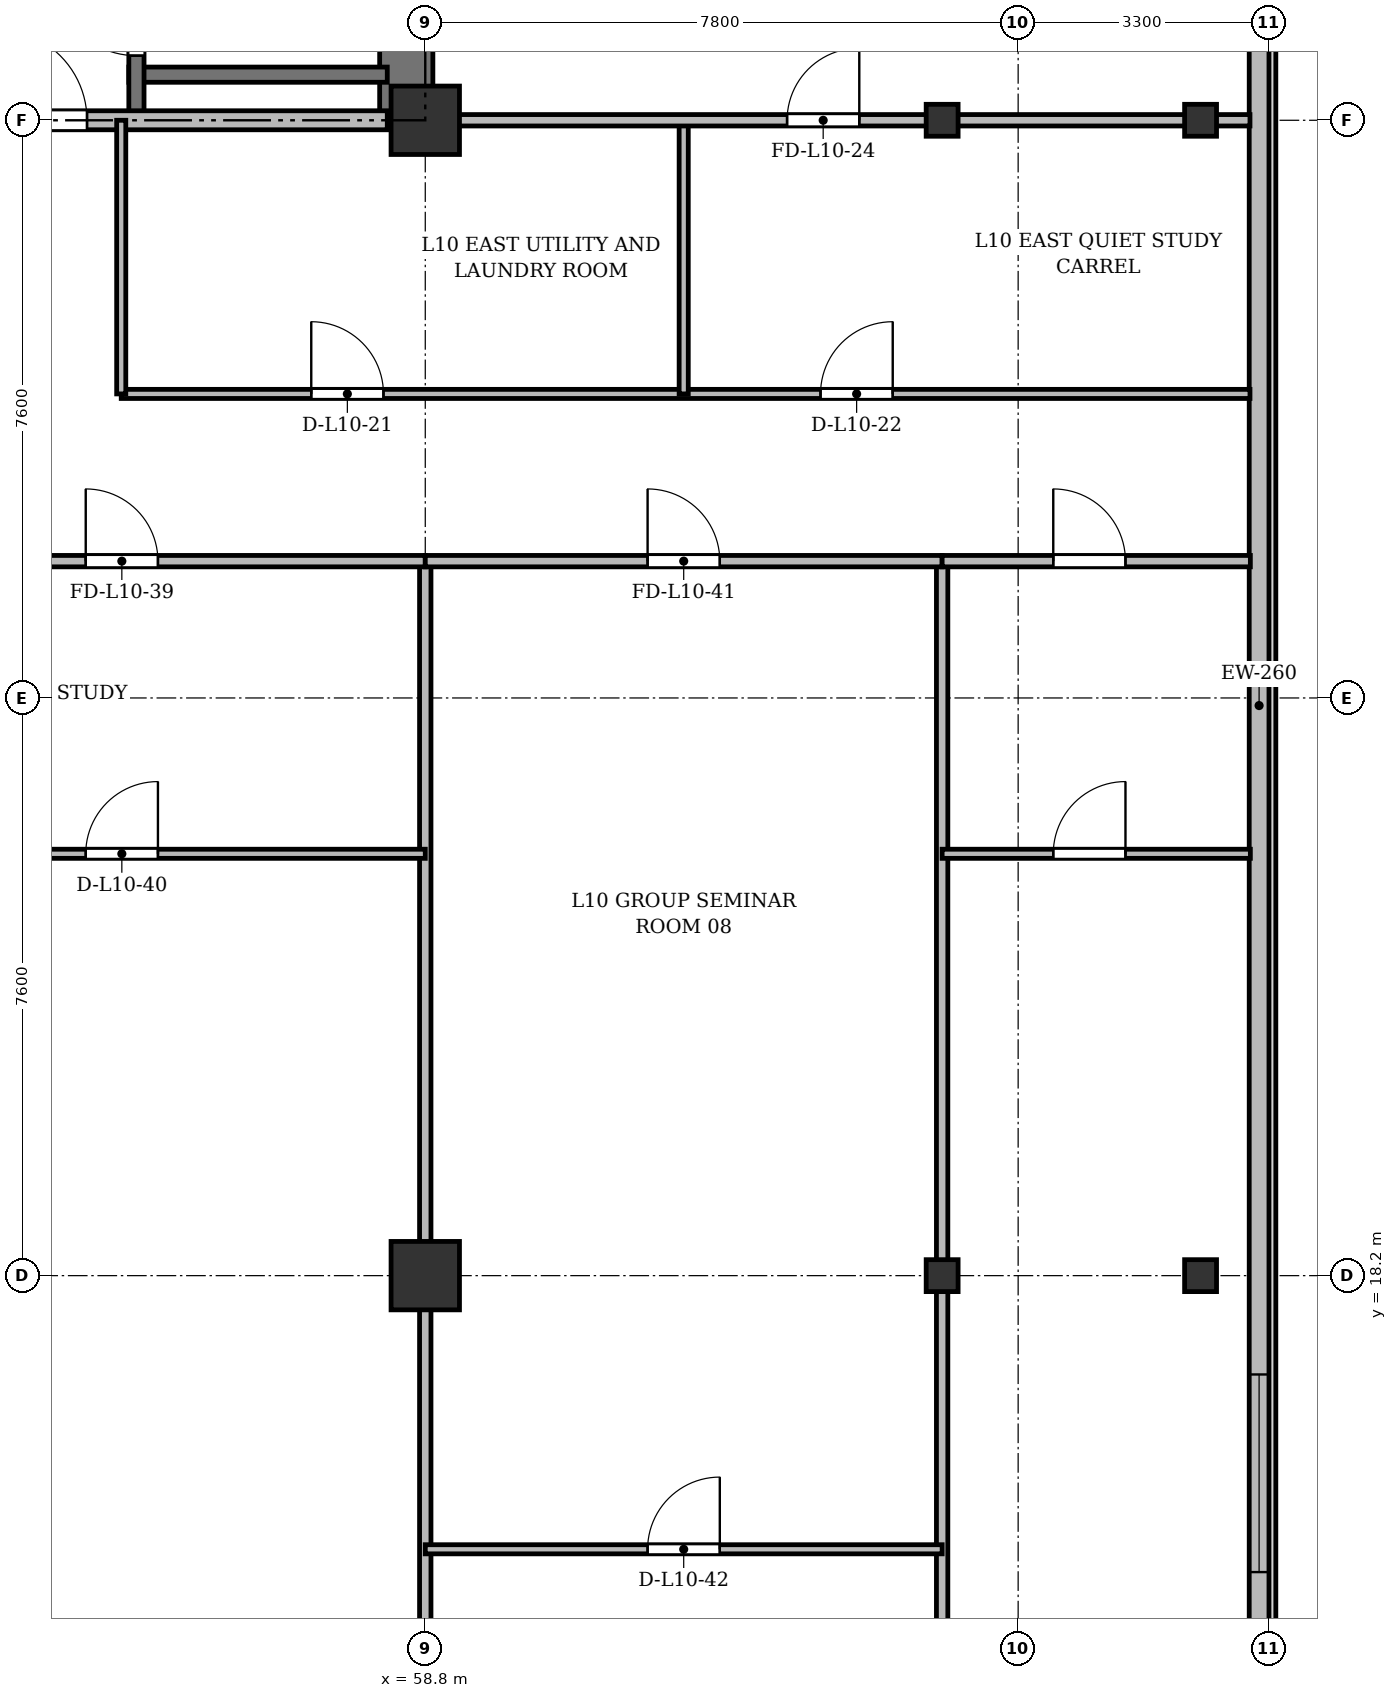
"""IFC4 building model, lengths in metres.
Left out: names, types, materials, properties, quantities, classifications, styles, units other than length and angle.
Written with IfcOpenShell. Run it as: python <this file> out.ifc"""

import sys

from ifc_helpers import new_model, si_unit, direction, frame, frame_2d, origin, origin_2d, place, context, subcontext, project, spatial, rectangle, i_section, extrude, source, transform, mapped, element, fill, save


model = new_model("IFC4")
c1 = context("Model", 3, precision=1e-05, world=origin(), true_north=direction((0.0, 1.0)))
c2 = subcontext(c1, "Body", "Model", "MODEL_VIEW")
j1 = project(units=[si_unit("LENGTHUNIT", "METRE"), si_unit("PLANEANGLEUNIT", "RADIAN")], contexts=[c1])
p1 = place(None, origin())
s1 = spatial("IfcSite", under=j1, at=p1, CompositionType="ELEMENT")
p2 = place(p1, origin())
s2 = spatial("IfcBuilding", under=s1, at=p2, CompositionType="ELEMENT")
p3 = place(p2, frame((0.0, 0.0, 41.5)))
s3 = spatial("IfcBuildingStorey", under=s2, at=p3, CompositionType="ELEMENT", Elevation=41.5)
m1 = source(origin(), c2, "Body", "SweptSolid", [
    extrude(rectangle(XDim=0.9, YDim=0.9, at=origin_2d()), origin(), (0.0, 0.0, 1.0), 3.6),
])
for number, where, z_axis, x_axis in (
    (1, (58.8, 18.2, 0.0), (0.0, 0.0, 1.0), (1.0, 0.0, 0.0)),
    (2, (58.8, 33.4, 0.0), (0.0, 0.0, 1.0), (1.0, 0.0, 0.0)),
):
    element("IfcColumn", number, at=place(p3, frame(where, z_axis=z_axis, x_axis=x_axis)), inside=s3, PredefinedType="COLUMN", context=c2, shape_type="MappedRepresentation", body=[
        mapped(m1, transform((0.0, 0.0, 0.0), x_axis=(1.0, 0.0, 0.0), y_axis=(0.0, 1.0, 0.0), z_axis=(0.0, 0.0, 1.0), scale=1.0)),
    ])
m2 = source(origin(), c2, "Body", "SweptSolid", [
    extrude(i_section(OverallWidth=0.42, OverallDepth=0.42, WebThickness=0.026, FlangeThickness=0.04, at=origin_2d()), origin(), (0.0, 0.0, 1.0), 3.6),
])
for number, where, z_axis, x_axis in (
    (3, (65.6, 18.2, 0.0), (0.0, 0.0, 1.0), (1.0, 0.0, 0.0)),
    (4, (65.6, 33.4, 0.0), (0.0, 0.0, 1.0), (1.0, 0.0, 0.0)),
    (5, (69.0, 18.2, 0.0), (0.0, 0.0, 1.0), (1.0, 0.0, 0.0)),
    (6, (69.0, 33.4, 0.0), (0.0, 0.0, 1.0), (1.0, 0.0, 0.0)),
):
    element("IfcColumn", number, at=place(p3, frame(where, z_axis=z_axis, x_axis=x_axis)), inside=s3, PredefinedType="COLUMN", context=c2, shape_type="MappedRepresentation", body=[
        mapped(m2, transform((0.0, 0.0, 0.0), x_axis=(1.0, 0.0, 0.0), y_axis=(0.0, 1.0, 0.0), z_axis=(0.0, 0.0, 1.0), scale=1.0)),
    ])
p4 = place(p3, frame((69.77, 45.5, 0.0), z_axis=(0.0, 0.0, 1.0), x_axis=(0.0, -1.0, 0.0)))
e7 = element("IfcWall", 7, at=p4, inside=s3, PredefinedType="SOLIDWALL", context=c2, shape_type="SweptSolid", body=[
    extrude(rectangle(XDim=39.6, YDim=0.26, at=frame_2d((19.8, 0.0))), origin(), (0.0, 0.0, 1.0), 3.34),
])
p5 = place(p4, frame((36.95, 0.0, 0.92)))
e8 = element("IfcOpeningElement", 8, at=p5, cuts=e7, PredefinedType="OPENING", context=c2, shape_type="SweptSolid", body=[
    extrude(rectangle(XDim=1.2, YDim=1.65, at=frame_2d((0.6, 0.825))), frame((0.0, 0.14, 0.0), z_axis=(0.0, -1.0, 0.0), x_axis=(1.0, 0.0, 0.0)), (0.0, 0.0, 1.0), 0.28),
])
p6 = place(p4, frame((32.8, 0.0, 0.92)))
e9 = element("IfcOpeningElement", 9, at=p6, cuts=e7, PredefinedType="OPENING", context=c2, shape_type="SweptSolid", body=[
    extrude(rectangle(XDim=2.6, YDim=1.9, at=frame_2d((1.3, 0.95))), frame((0.0, 0.14, 0.0), z_axis=(0.0, -1.0, 0.0), x_axis=(1.0, 0.0, 0.0)), (0.0, 0.0, 1.0), 0.28),
])
p7 = place(p4, frame((28.6, 0.0, 0.92)))
e10 = element("IfcOpeningElement", 10, at=p7, cuts=e7, PredefinedType="OPENING", context=c2, shape_type="SweptSolid", body=[
    extrude(rectangle(XDim=2.6, YDim=1.9, at=frame_2d((1.3, 0.95))), frame((0.0, 0.14, 0.0), z_axis=(0.0, -1.0, 0.0), x_axis=(1.0, 0.0, 0.0)), (0.0, 0.0, 1.0), 0.28),
])
p8 = place(p4, frame((7.4, 0.0, 0.92)))
e11 = element("IfcOpeningElement", 11, at=p8, cuts=e7, PredefinedType="OPENING", context=c2, shape_type="SweptSolid", body=[
    extrude(rectangle(XDim=2.6, YDim=1.9, at=frame_2d((1.3, 0.95))), frame((0.0, 0.14, 0.0), z_axis=(0.0, -1.0, 0.0), x_axis=(1.0, 0.0, 0.0)), (0.0, 0.0, 1.0), 0.28),
])
p9 = place(p4, frame((4.5, 0.0, 0.92)))
e12 = element("IfcOpeningElement", 12, at=p9, cuts=e7, PredefinedType="OPENING", context=c2, shape_type="SweptSolid", body=[
    extrude(rectangle(XDim=1.2, YDim=1.65, at=frame_2d((0.6, 0.825))), frame((0.0, 0.14, 0.0), z_axis=(0.0, -1.0, 0.0), x_axis=(1.0, 0.0, 0.0)), (0.0, 0.0, 1.0), 0.28),
])
p10 = place(p4, frame((1.15, 0.0, 0.92)))
e13 = element("IfcOpeningElement", 13, at=p10, cuts=e7, PredefinedType="OPENING", context=c2, shape_type="SweptSolid", body=[
    extrude(rectangle(XDim=1.2, YDim=1.65, at=frame_2d((0.6, 0.825))), frame((0.0, 0.14, 0.0), z_axis=(0.0, -1.0, 0.0), x_axis=(1.0, 0.0, 0.0)), (0.0, 0.0, 1.0), 0.28),
])
p11 = place(p3, frame((58.55, 33.4, 0.0), z_axis=(0.0, 0.0, 1.0), x_axis=(0.0, 1.0, 0.0)))
e14 = element("IfcWall", 14, at=p11, inside=s3, PredefinedType="SHEAR", context=c2, shape_type="SweptSolid", body=[
    extrude(rectangle(XDim=11.7, YDim=0.7, at=frame_2d((5.85, 0.0))), origin(), (0.0, 0.0, 1.0), 3.34),
])
p12 = place(p3, frame((54.9, 34.0, 0.0), z_axis=(0.0, 0.0, 1.0), x_axis=(1.0, 0.0, 0.0)))
e15 = element("IfcWall", 15, at=p12, inside=s3, PredefinedType="SHEAR", context=c2, shape_type="SweptSolid", body=[
    extrude(rectangle(XDim=3.4, YDim=0.2, at=frame_2d((1.7, 0.0))), origin(), (0.0, 0.0, 1.0), 3.34),
])
p13 = place(p3, frame((55.0, 33.4, 0.0), z_axis=(0.0, 0.0, 1.0), x_axis=(0.0, 1.0, 0.0)))
e16 = element("IfcWall", 16, at=p13, inside=s3, PredefinedType="SHEAR", context=c2, shape_type="SweptSolid", body=[
    extrude(rectangle(XDim=11.1, YDim=0.2, at=frame_2d((5.55, 0.0))), origin(), (0.0, 0.0, 1.0), 3.34),
])
p14 = place(p13, frame((0.85, 0.0, 0.0)))
e17 = element("IfcOpeningElement", 17, at=p14, cuts=e16, PredefinedType="OPENING", context=c2, shape_type="SweptSolid", body=[
    extrude(rectangle(XDim=1.1, YDim=2.15, at=frame_2d((0.55, 1.075))), frame((0.0, 0.11, 0.0), z_axis=(0.0, -1.0, 0.0), x_axis=(1.0, 0.0, 0.0)), (0.0, 0.0, 1.0), 0.22),
])
p15 = place(p3, frame((47.15, 33.4, 0.0), z_axis=(0.0, 0.0, 1.0), x_axis=(1.0, 0.0, 0.0)))
e18 = element("IfcWall", 18, at=p15, inside=s3, PredefinedType="PARTITIONING", context=c2, shape_type="SweptSolid", body=[
    extrude(rectangle(XDim=11.15, YDim=0.25, at=frame_2d((5.575, 0.0))), origin(), (0.0, 0.0, 1.0), 2.69),
])
p16 = place(p15, frame((0.7, 0.0, 0.0)))
e19 = element("IfcOpeningElement", 19, at=p16, cuts=e18, PredefinedType="OPENING", context=c2, shape_type="SweptSolid", body=[
    extrude(rectangle(XDim=0.95, YDim=2.15, at=frame_2d((0.475, 1.075))), frame((0.0, 0.135, 0.0), z_axis=(0.0, -1.0, 0.0), x_axis=(1.0, 0.0, 0.0)), (0.0, 0.0, 1.0), 0.27),
])
p17 = place(p15, frame((6.0, 0.0, 0.0)))
e20 = element("IfcOpeningElement", 20, at=p17, cuts=e18, PredefinedType="OPENING", context=c2, shape_type="SweptSolid", body=[
    extrude(rectangle(XDim=1.2, YDim=2.15, at=frame_2d((0.6, 1.075))), frame((0.0, 0.135, 0.0), z_axis=(0.0, -1.0, 0.0), x_axis=(1.0, 0.0, 0.0)), (0.0, 0.0, 1.0), 0.27),
])
p18 = place(p3, frame((54.8, 29.8, 0.0), z_axis=(0.0, 0.0, 1.0), x_axis=(1.0, 0.0, 0.0)))
e21 = element("IfcWall", 21, at=p18, inside=s3, PredefinedType="PARTITIONING", context=c2, shape_type="SweptSolid", body=[
    extrude(rectangle(XDim=14.85, YDim=0.12, at=frame_2d((7.425, 0.0))), origin(), (0.0, 0.0, 1.0), 2.752),
])
p19 = place(p18, frame((2.5, 0.0, 0.0)))
e22 = element("IfcOpeningElement", 22, at=p19, cuts=e21, PredefinedType="OPENING", context=c2, shape_type="SweptSolid", body=[
    extrude(rectangle(XDim=0.95, YDim=2.15, at=frame_2d((0.475, 1.075))), frame((0.0, 0.07, 0.0), z_axis=(0.0, -1.0, 0.0), x_axis=(1.0, 0.0, 0.0)), (0.0, 0.0, 1.0), 0.14),
])
p20 = place(p18, frame((9.2, 0.0, 0.0)))
e23 = element("IfcOpeningElement", 23, at=p20, cuts=e21, PredefinedType="OPENING", context=c2, shape_type="SweptSolid", body=[
    extrude(rectangle(XDim=0.95, YDim=2.15, at=frame_2d((0.475, 1.075))), frame((0.0, 0.07, 0.0), z_axis=(0.0, -1.0, 0.0), x_axis=(1.0, 0.0, 0.0)), (0.0, 0.0, 1.0), 0.14),
])
for number, where, z_axis, x_axis in (
    (24, (62.2, 29.8, 0.0), (0.0, 0.0, 1.0), (0.0, 1.0, 0.0)),
    (25, (54.8, 29.8, 0.0), (0.0, 0.0, 1.0), (0.0, 1.0, 0.0)),
):
    element("IfcWall", number, at=place(p3, frame(where, z_axis=z_axis, x_axis=x_axis)), inside=s3, PredefinedType="PARTITIONING", context=c2, shape_type="SweptSolid", body=[
        extrude(rectangle(XDim=3.6, YDim=0.12, at=frame_2d((1.8, 0.0))), origin(), (0.0, 0.0, 1.0), 2.69),
    ])
p21 = place(p3, frame((58.8, 33.4, 0.0), z_axis=(0.0, 0.0, 1.0), x_axis=(1.0, 0.0, 0.0)))
e26 = element("IfcWall", 26, at=p21, inside=s3, PredefinedType="PARTITIONING", context=c2, shape_type="SweptSolid", body=[
    extrude(rectangle(XDim=10.85, YDim=0.15, at=frame_2d((5.425, 0.0))), origin(), (0.0, 0.0, 1.0), 2.69),
])
p22 = place(p21, frame((4.76, 0.0, 0.0)))
e27 = element("IfcOpeningElement", 27, at=p22, cuts=e26, PredefinedType="OPENING", context=c2, shape_type="SweptSolid", body=[
    extrude(rectangle(XDim=0.95, YDim=2.15, at=frame_2d((0.475, 1.075))), frame((0.0, 0.085, 0.0), z_axis=(0.0, -1.0, 0.0), x_axis=(1.0, 0.0, 0.0)), (0.0, 0.0, 1.0), 0.17),
])
for number, where, z_axis, x_axis in (
    (28, (58.8, 3.145, 0.0), (0.0, 0.0, 1.0), (0.0, 1.0, 0.0)),
    (29, (65.6, 3.145, 0.0), (0.0, 0.0, 1.0), (0.0, 1.0, 0.0)),
):
    element("IfcWall", number, at=place(p3, frame(where, z_axis=z_axis, x_axis=x_axis)), inside=s3, PredefinedType="PARTITIONING", context=c2, shape_type="SweptSolid", body=[
        extrude(rectangle(XDim=24.455, YDim=0.15, at=frame_2d((12.228, 0.0))), origin(), (0.0, 0.0, 1.0), 2.752),
    ])
p23 = place(p3, frame((51.0, 27.6, 0.0), z_axis=(0.0, 0.0, 1.0), x_axis=(1.0, 0.0, 0.0)))
e30 = element("IfcWall", 30, at=p23, inside=s3, PredefinedType="PARTITIONING", context=c2, shape_type="SweptSolid", body=[
    extrude(rectangle(XDim=7.8, YDim=0.15, at=frame_2d((3.9, 0.0))), origin(), (0.0, 0.0, 1.0), 2.752),
])
p24 = place(p23, frame((3.333, 0.0, 0.0)))
e31 = element("IfcOpeningElement", 31, at=p24, cuts=e30, PredefinedType="OPENING", context=c2, shape_type="SweptSolid", body=[
    extrude(rectangle(XDim=0.95, YDim=2.15, at=frame_2d((0.475, 1.075))), frame((0.0, 0.085, 0.0), z_axis=(0.0, -1.0, 0.0), x_axis=(1.0, 0.0, 0.0)), (0.0, 0.0, 1.0), 0.17),
])
p25 = place(p3, frame((51.0, 23.75, 0.0), z_axis=(0.0, 0.0, 1.0), x_axis=(1.0, 0.0, 0.0)))
e32 = element("IfcWall", 32, at=p25, inside=s3, PredefinedType="PARTITIONING", context=c2, shape_type="SweptSolid", body=[
    extrude(rectangle(XDim=7.8, YDim=0.12, at=frame_2d((3.9, 0.0))), origin(), (0.0, 0.0, 1.0), 2.752),
])
p26 = place(p25, frame((3.333, 0.0, 0.0)))
e33 = element("IfcOpeningElement", 33, at=p26, cuts=e32, PredefinedType="OPENING", context=c2, shape_type="SweptSolid", body=[
    extrude(rectangle(XDim=0.95, YDim=2.15, at=frame_2d((0.475, 1.075))), frame((0.0, 0.07, 0.0), z_axis=(0.0, -1.0, 0.0), x_axis=(1.0, 0.0, 0.0)), (0.0, 0.0, 1.0), 0.14),
])
p27 = place(p3, frame((58.8, 27.6, 0.0), z_axis=(0.0, 0.0, 1.0), x_axis=(1.0, 0.0, 0.0)))
e34 = element("IfcWall", 34, at=p27, inside=s3, PredefinedType="PARTITIONING", context=c2, shape_type="SweptSolid", body=[
    extrude(rectangle(XDim=6.8, YDim=0.15, at=frame_2d((3.4, 0.0))), origin(), (0.0, 0.0, 1.0), 2.752),
])
p28 = place(p27, frame((2.925, 0.0, 0.0)))
e35 = element("IfcOpeningElement", 35, at=p28, cuts=e34, PredefinedType="OPENING", context=c2, shape_type="SweptSolid", body=[
    extrude(rectangle(XDim=0.95, YDim=2.15, at=frame_2d((0.475, 1.075))), frame((0.0, 0.085, 0.0), z_axis=(0.0, -1.0, 0.0), x_axis=(1.0, 0.0, 0.0)), (0.0, 0.0, 1.0), 0.17),
])
p29 = place(p3, frame((58.8, 14.6, 0.0), z_axis=(0.0, 0.0, 1.0), x_axis=(1.0, 0.0, 0.0)))
e36 = element("IfcWall", 36, at=p29, inside=s3, PredefinedType="PARTITIONING", context=c2, shape_type="SweptSolid", body=[
    extrude(rectangle(XDim=6.8, YDim=0.12, at=frame_2d((3.4, 0.0))), origin(), (0.0, 0.0, 1.0), 2.752),
])
p30 = place(p29, frame((2.925, 0.0, 0.0)))
e37 = element("IfcOpeningElement", 37, at=p30, cuts=e36, PredefinedType="OPENING", context=c2, shape_type="SweptSolid", body=[
    extrude(rectangle(XDim=0.95, YDim=2.15, at=frame_2d((0.475, 1.075))), frame((0.0, 0.07, 0.0), z_axis=(0.0, -1.0, 0.0), x_axis=(1.0, 0.0, 0.0)), (0.0, 0.0, 1.0), 0.14),
])
p31 = place(p3, frame((65.6, 27.6, 0.0), z_axis=(0.0, 0.0, 1.0), x_axis=(1.0, 0.0, 0.0)))
e38 = element("IfcWall", 38, at=p31, inside=s3, PredefinedType="PARTITIONING", context=c2, shape_type="SweptSolid", body=[
    extrude(rectangle(XDim=4.055, YDim=0.15, at=frame_2d((2.027, 0.0))), origin(), (0.0, 0.0, 1.0), 2.752),
])
p32 = place(p31, frame((1.462, 0.0, 0.0)))
e39 = element("IfcOpeningElement", 39, at=p32, cuts=e38, PredefinedType="OPENING", context=c2, shape_type="SweptSolid", body=[
    extrude(rectangle(XDim=0.95, YDim=2.15, at=frame_2d((0.475, 1.075))), frame((0.0, 0.085, 0.0), z_axis=(0.0, -1.0, 0.0), x_axis=(1.0, 0.0, 0.0)), (0.0, 0.0, 1.0), 0.17),
])
p33 = place(p3, frame((65.6, 23.75, 0.0), z_axis=(0.0, 0.0, 1.0), x_axis=(1.0, 0.0, 0.0)))
e40 = element("IfcWall", 40, at=p33, inside=s3, PredefinedType="PARTITIONING", context=c2, shape_type="SweptSolid", body=[
    extrude(rectangle(XDim=4.055, YDim=0.12, at=frame_2d((2.027, 0.0))), origin(), (0.0, 0.0, 1.0), 2.752),
])
p34 = place(p33, frame((1.462, 0.0, 0.0)))
e41 = element("IfcOpeningElement", 41, at=p34, cuts=e40, PredefinedType="OPENING", context=c2, shape_type="SweptSolid", body=[
    extrude(rectangle(XDim=0.95, YDim=2.15, at=frame_2d((0.475, 1.075))), frame((0.0, 0.07, 0.0), z_axis=(0.0, -1.0, 0.0), x_axis=(1.0, 0.0, 0.0)), (0.0, 0.0, 1.0), 0.14),
])
m3 = source(origin(), c2, "Body", "SweptSolid", [
    extrude(rectangle(XDim=2.6, YDim=1.9, at=frame_2d((1.3, 0.95))), frame((0.0, 0.03, 0.0), z_axis=(0.0, -1.0, 0.0), x_axis=(1.0, 0.0, 0.0)), (0.0, 0.0, 1.0), 0.06),
])
p35 = place(p7, origin())
e42 = element("IfcWindow", 42, at=p35, inside=s3, PartitioningType="SINGLE_PANEL", PredefinedType="WINDOW", context=c2, shape_type="MappedRepresentation", body=[
    mapped(m3, transform((0.0, 0.0, 0.0), x_axis=(1.0, 0.0, 0.0), y_axis=(0.0, 1.0, 0.0), z_axis=(0.0, 0.0, 1.0), scale=1.0)),
])
fill(e10, e42)
m4 = source(origin(), c2, "Body", "SweptSolid", [
    extrude(rectangle(XDim=1.1, YDim=2.15, at=frame_2d((0.55, 1.075))), frame((0.0, 0.025, 0.0), z_axis=(0.0, -1.0, 0.0), x_axis=(1.0, 0.0, 0.0)), (0.0, 0.0, 1.0), 0.05),
])
p36 = place(p14, origin())
e43 = element("IfcDoor", 43, at=p36, inside=s3, OperationType="SINGLE_SWING_RIGHT", PredefinedType="DOOR", context=c2, shape_type="MappedRepresentation", body=[
    mapped(m4, transform((0.0, 0.0, 0.0), x_axis=(1.0, 0.0, 0.0), y_axis=(0.0, 1.0, 0.0), z_axis=(0.0, 0.0, 1.0), scale=1.0)),
])
fill(e17, e43)
m5 = source(origin(), c2, "Body", "SweptSolid", [
    extrude(rectangle(XDim=1.2, YDim=2.15, at=frame_2d((0.6, 1.075))), frame((0.0, 0.025, 0.0), z_axis=(0.0, -1.0, 0.0), x_axis=(1.0, 0.0, 0.0)), (0.0, 0.0, 1.0), 0.05),
])
p37 = place(p17, origin())
e44 = element("IfcDoor", 44, at=p37, inside=s3, OperationType="SINGLE_SWING_LEFT", PredefinedType="DOOR", context=c2, shape_type="MappedRepresentation", body=[
    mapped(m5, transform((0.0, 0.0, 0.0), x_axis=(1.0, 0.0, 0.0), y_axis=(0.0, 1.0, 0.0), z_axis=(0.0, 0.0, 1.0), scale=1.0)),
])
fill(e20, e44)
m6 = source(origin(), c2, "Body", "SweptSolid", [
    extrude(rectangle(XDim=0.95, YDim=2.15, at=frame_2d((0.475, 1.075))), frame((0.0, 0.025, 0.0), z_axis=(0.0, -1.0, 0.0), x_axis=(1.0, 0.0, 0.0)), (0.0, 0.0, 1.0), 0.05),
])
p38 = place(p19, origin())
e45 = element("IfcDoor", 45, at=p38, inside=s3, OperationType="SINGLE_SWING_LEFT", PredefinedType="DOOR", context=c2, shape_type="MappedRepresentation", body=[
    mapped(m6, transform((0.0, 0.0, 0.0), x_axis=(1.0, 0.0, 0.0), y_axis=(0.0, 1.0, 0.0), z_axis=(0.0, 0.0, 1.0), scale=1.0)),
])
fill(e22, e45)
p39 = place(p20, origin())
e46 = element("IfcDoor", 46, at=p39, inside=s3, OperationType="SINGLE_SWING_RIGHT", PredefinedType="DOOR", context=c2, shape_type="MappedRepresentation", body=[
    mapped(m6, transform((0.0, 0.0, 0.0), x_axis=(1.0, 0.0, 0.0), y_axis=(0.0, 1.0, 0.0), z_axis=(0.0, 0.0, 1.0), scale=1.0)),
])
fill(e23, e46)
p40 = place(p22, origin())
e47 = element("IfcDoor", 47, at=p40, inside=s3, OperationType="SINGLE_SWING_RIGHT", PredefinedType="DOOR", context=c2, shape_type="MappedRepresentation", body=[
    mapped(m6, transform((0.0, 0.0, 0.0), x_axis=(1.0, 0.0, 0.0), y_axis=(0.0, 1.0, 0.0), z_axis=(0.0, 0.0, 1.0), scale=1.0)),
])
fill(e27, e47)
p41 = place(p24, origin())
e48 = element("IfcDoor", 48, at=p41, inside=s3, OperationType="SINGLE_SWING_LEFT", PredefinedType="DOOR", context=c2, shape_type="MappedRepresentation", body=[
    mapped(m6, transform((0.0, 0.0, 0.0), x_axis=(1.0, 0.0, 0.0), y_axis=(0.0, 1.0, 0.0), z_axis=(0.0, 0.0, 1.0), scale=1.0)),
])
fill(e31, e48)
p42 = place(p26, origin())
e49 = element("IfcDoor", 49, at=p42, inside=s3, OperationType="SINGLE_SWING_RIGHT", PredefinedType="DOOR", context=c2, shape_type="MappedRepresentation", body=[
    mapped(m6, transform((0.0, 0.0, 0.0), x_axis=(1.0, 0.0, 0.0), y_axis=(0.0, 1.0, 0.0), z_axis=(0.0, 0.0, 1.0), scale=1.0)),
])
fill(e33, e49)
p43 = place(p28, origin())
e50 = element("IfcDoor", 50, at=p43, inside=s3, OperationType="SINGLE_SWING_LEFT", PredefinedType="DOOR", context=c2, shape_type="MappedRepresentation", body=[
    mapped(m6, transform((0.0, 0.0, 0.0), x_axis=(1.0, 0.0, 0.0), y_axis=(0.0, 1.0, 0.0), z_axis=(0.0, 0.0, 1.0), scale=1.0)),
])
fill(e35, e50)
p44 = place(p30, origin())
e51 = element("IfcDoor", 51, at=p44, inside=s3, OperationType="SINGLE_SWING_RIGHT", PredefinedType="DOOR", context=c2, shape_type="MappedRepresentation", body=[
    mapped(m6, transform((0.0, 0.0, 0.0), x_axis=(1.0, 0.0, 0.0), y_axis=(0.0, 1.0, 0.0), z_axis=(0.0, 0.0, 1.0), scale=1.0)),
])
fill(e37, e51)
p45 = place(p32, origin())
e52 = element("IfcDoor", 52, at=p45, inside=s3, OperationType="SINGLE_SWING_LEFT", PredefinedType="DOOR", context=c2, shape_type="MappedRepresentation", body=[
    mapped(m6, transform((0.0, 0.0, 0.0), x_axis=(1.0, 0.0, 0.0), y_axis=(0.0, 1.0, 0.0), z_axis=(0.0, 0.0, 1.0), scale=1.0)),
])
fill(e39, e52)
p46 = place(p34, origin())
e53 = element("IfcDoor", 53, at=p46, inside=s3, OperationType="SINGLE_SWING_RIGHT", PredefinedType="DOOR", context=c2, shape_type="MappedRepresentation", body=[
    mapped(m6, transform((0.0, 0.0, 0.0), x_axis=(1.0, 0.0, 0.0), y_axis=(0.0, 1.0, 0.0), z_axis=(0.0, 0.0, 1.0), scale=1.0)),
])
fill(e41, e53)
save(model, sys.argv[1])
